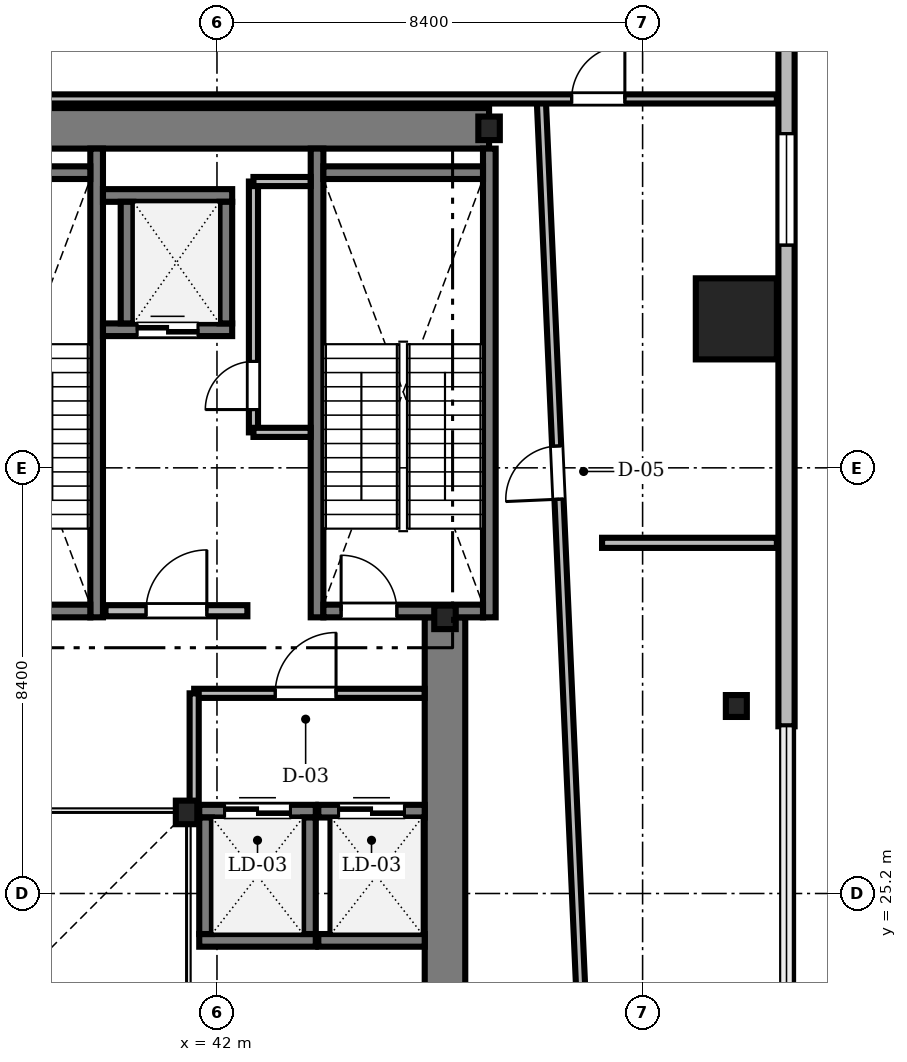
"""IFC4 building model, lengths in metres.
Left out: names, types, materials, properties, quantities, classifications, styles, units other than length and angle.
Written with IfcOpenShell. Run it as: python <this file> out.ifc"""

import sys

from ifc_helpers import new_model, si_unit, direction, frame, frame_2d, origin, origin_2d, place, context, subcontext, project, spatial, rectangle, i_section, extrude, source, transform, mapped, element, fill, save


model = new_model("IFC4")
c1 = context("Model", 3, precision=1e-05, world=origin(), true_north=direction((0.0, 1.0)))
c2 = subcontext(c1, "Body", "Model", "MODEL_VIEW")
j1 = project(units=[si_unit("LENGTHUNIT", "METRE"), si_unit("PLANEANGLEUNIT", "RADIAN")], contexts=[c1])
p1 = place(None, origin())
s1 = spatial("IfcSite", under=j1, at=p1, CompositionType="ELEMENT")
p2 = place(p1, origin())
s2 = spatial("IfcBuilding", under=s1, at=p2, CompositionType="ELEMENT")
p3 = place(p2, frame((0.0, 0.0, 98.7)))
s3 = spatial("IfcBuildingStorey", under=s2, at=p3, CompositionType="ELEMENT", Elevation=98.7)
m1 = source(origin(), c2, "Body", "SweptSolid", [
    extrude(rectangle(XDim=17.52, YDim=0.8, at=frame_2d((8.76, 0.0))), origin(), (0.0, 0.0, 1.0), 4.76),
])
p4 = place(p3, frame((29.85, 40.3, 0.0), z_axis=(0.0, 0.0, 1.0), x_axis=(1.0, 0.0, 0.0)))
e1 = element("IfcWall", 1, at=p4, inside=s3, PredefinedType="SHEAR", context=c2, shape_type="MappedRepresentation", body=[
    mapped(m1, transform((0.0, 0.0, 0.0), scale=1.0)),
])
m2 = source(origin(), c2, "Body", "SweptSolid", [
    extrude(rectangle(XDim=13.15, YDim=0.8, at=frame_2d((6.575, 0.0))), origin(), (0.0, 0.0, 1.0), 4.76),
])
p5 = place(p3, frame((46.5, 17.5, 0.0), z_axis=(0.0, 0.0, 1.0), x_axis=(0.0, 1.0, 0.0)))
e2 = element("IfcWall", 2, at=p5, inside=s3, PredefinedType="SHEAR", context=c2, shape_type="MappedRepresentation", body=[
    mapped(m2, transform((0.0, 0.0, 0.0), scale=1.0)),
])
m3 = source(origin(), c2, "Body", "SweptSolid", [
    extrude(i_section(OverallWidth=0.424, OverallDepth=0.465, WebThickness=0.035, FlangeThickness=0.056, FilletRadius=0.015, at=origin_2d()), origin(), (0.0, 0.0, 1.0), 4.76),
])
for number, where, z_axis, x_axis in (
    (3, (41.4, 26.8, 0.0), (0.0, 0.0, 1.0), (1.0, 0.0, 0.0)),
    (4, (46.5, 30.65, 0.0), (0.0, 0.0, 1.0), (1.0, 0.0, 0.0)),
    (5, (47.37, 40.3, 0.0), (0.0, 0.0, 1.0), (1.0, 0.0, 0.0)),
):
    element("IfcColumn", number, at=place(p3, frame(where, z_axis=z_axis, x_axis=x_axis)), inside=s3, PredefinedType="COLUMN", context=c2, shape_type="MappedRepresentation", body=[
        mapped(m3, transform((0.0, 0.0, 0.0), scale=1.0)),
    ])
m4 = source(origin(), c2, "Body", "SweptSolid", [
    extrude(rectangle(XDim=1.6, YDim=1.6, at=origin_2d()), origin(), (0.0, 0.0, 1.0), 4.76),
])
p6 = place(p3, frame((52.25, 36.54, 0.0), z_axis=(0.0, 0.0, 1.0), x_axis=(1.0, 0.0, 0.0)))
e6 = element("IfcColumn", 6, at=p6, inside=s3, PredefinedType="COLUMN", context=c2, shape_type="MappedRepresentation", body=[
    mapped(m4, transform((0.0, 0.0, 0.0), scale=1.0)),
])
m5 = source(origin(), c2, "Body", "SweptSolid", [
    extrude(i_section(OverallWidth=0.414, OverallDepth=0.432, WebThickness=0.026, FlangeThickness=0.04, FilletRadius=0.015, at=origin_2d()), origin(), (0.0, 0.0, 1.0), 4.76),
])
p7 = place(p3, frame((52.25, 28.9, 0.0), z_axis=(0.0, 0.0, 1.0), x_axis=(1.0, 0.0, 0.0)))
e7 = element("IfcColumn", 7, at=p7, inside=s3, PredefinedType="COLUMN", context=c2, shape_type="MappedRepresentation", body=[
    mapped(m5, transform((0.0, 0.0, 0.0), scale=1.0)),
])
m6 = source(origin(), c2, "Body", "SweptSolid", [
    extrude(rectangle(XDim=15.6, YDim=0.32, at=frame_2d((7.8, 0.0))), origin(), (0.0, 0.0, 1.0), 4.76),
])
p8 = place(p3, frame((53.24, 28.5, 0.0), z_axis=(0.0, 0.0, 1.0), x_axis=(0.0, 1.0, 0.0)))
e8 = element("IfcWall", 8, at=p8, inside=s3, PredefinedType="SOLIDWALL", context=c2, shape_type="MappedRepresentation", body=[
    mapped(m6, transform((0.0, 0.0, 0.0), scale=1.0)),
])
m7 = source(origin(), c2, "Body", "SweptSolid", [
    extrude(rectangle(XDim=2.2, YDim=2.4, at=frame_2d((1.1, 1.2))), frame((0.0, 0.17, 0.0), z_axis=(0.0, -1.0, 0.0), x_axis=(1.0, 0.0, 0.0)), (0.0, 0.0, 1.0), 0.34),
])
p9 = place(p8, frame((9.495, 0.0, 0.72)))
e9 = element("IfcOpeningElement", 9, at=p9, cuts=e8, PredefinedType="OPENING", context=c2, shape_type="MappedRepresentation", body=[
    mapped(m7, transform((0.0, 0.0, 0.0), scale=1.0)),
])
m8 = source(origin(), c2, "Body", "SweptSolid", [
    extrude(rectangle(XDim=9.25, YDim=0.25, at=frame_2d((4.625, 0.0))), origin(), (0.0, 0.0, 1.0), 4.8),
])
p10 = place(p3, frame((39.625, 30.65, 0.0), z_axis=(0.0, 0.0, 1.0), x_axis=(0.0, 1.0, 0.0)))
e10 = element("IfcWall", 10, at=p10, inside=s3, PredefinedType="SOLIDWALL", context=c2, shape_type="MappedRepresentation", body=[
    mapped(m8, transform((0.0, 0.0, 0.0), scale=1.0)),
])
m9 = source(origin(), c2, "Body", "SweptSolid", [
    extrude(rectangle(XDim=3.15, YDim=0.25, at=frame_2d((1.575, 0.0))), origin(), (0.0, 0.0, 1.0), 4.8),
])
p11 = place(p3, frame((36.35, 39.425, 0.0), z_axis=(0.0, 0.0, 1.0), x_axis=(1.0, 0.0, 0.0)))
e11 = element("IfcWall", 11, at=p11, inside=s3, PredefinedType="SOLIDWALL", context=c2, shape_type="MappedRepresentation", body=[
    mapped(m9, transform((0.0, 0.0, 0.0), scale=1.0)),
])
p12 = place(p3, frame((36.35, 30.775, 0.0), z_axis=(0.0, 0.0, 1.0), x_axis=(1.0, 0.0, 0.0)))
e12 = element("IfcWall", 12, at=p12, inside=s3, PredefinedType="SOLIDWALL", context=c2, shape_type="MappedRepresentation", body=[
    mapped(m9, transform((0.0, 0.0, 0.0), scale=1.0)),
])
m10 = source(origin(), c2, "Body", "SweptSolid", [
    extrude(rectangle(XDim=1.1, YDim=2.2, at=frame_2d((0.55, 1.1))), frame((0.0, 0.135, 0.0), z_axis=(0.0, -1.0, 0.0), x_axis=(1.0, 0.0, 0.0)), (0.0, 0.0, 1.0), 0.27),
])
p13 = place(p12, frame((0.35, 0.0, 0.0)))
e13 = element("IfcOpeningElement", 13, at=p13, cuts=e12, PredefinedType="OPENING", context=c2, shape_type="MappedRepresentation", body=[
    mapped(m10, transform((0.0, 0.0, 0.0), scale=1.0)),
])
for number, where, z_axis, x_axis in (
    (14, (43.975, 30.65, 0.0), (0.0, 0.0, 1.0), (0.0, 1.0, 0.0)),
    (15, (47.375, 30.65, 0.0), (0.0, 0.0, 1.0), (0.0, 1.0, 0.0)),
):
    element("IfcWall", number, at=place(p3, frame(where, z_axis=z_axis, x_axis=x_axis)), inside=s3, PredefinedType="SOLIDWALL", context=c2, shape_type="MappedRepresentation", body=[
        mapped(m8, transform((0.0, 0.0, 0.0), scale=1.0)),
    ])
p14 = place(p3, frame((44.1, 39.425, 0.0), z_axis=(0.0, 0.0, 1.0), x_axis=(1.0, 0.0, 0.0)))
e16 = element("IfcWall", 16, at=p14, inside=s3, PredefinedType="SOLIDWALL", context=c2, shape_type="MappedRepresentation", body=[
    mapped(m9, transform((0.0, 0.0, 0.0), scale=1.0)),
])
p15 = place(p3, frame((44.1, 30.775, 0.0), z_axis=(0.0, 0.0, 1.0), x_axis=(1.0, 0.0, 0.0)))
e17 = element("IfcWall", 17, at=p15, inside=s3, PredefinedType="SOLIDWALL", context=c2, shape_type="MappedRepresentation", body=[
    mapped(m9, transform((0.0, 0.0, 0.0), scale=1.0)),
])
p16 = place(p15, frame((0.35, 0.0, 0.0)))
e18 = element("IfcOpeningElement", 18, at=p16, cuts=e17, PredefinedType="OPENING", context=c2, shape_type="MappedRepresentation", body=[
    mapped(m10, transform((0.0, 0.0, 0.0), scale=1.0)),
])
m11 = source(origin(), c2, "Body", "SweptSolid", [
    extrude(rectangle(XDim=2.8, YDim=0.22, at=frame_2d((1.4, 0.0))), origin(), (0.0, 0.0, 1.0), 4.76),
])
p17 = place(p3, frame((39.8, 30.78, 0.0), z_axis=(0.0, 0.0, 1.0), x_axis=(1.0, 0.0, 0.0)))
e19 = element("IfcWall", 19, at=p17, inside=s3, PredefinedType="SOLIDWALL", context=c2, shape_type="MappedRepresentation", body=[
    mapped(m11, transform((0.0, 0.0, 0.0), scale=1.0)),
])
m12 = source(origin(), c2, "Body", "SweptSolid", [
    extrude(rectangle(XDim=1.2, YDim=2.2, at=frame_2d((0.6, 1.1))), frame((0.0, 0.12, 0.0), z_axis=(0.0, -1.0, 0.0), x_axis=(1.0, 0.0, 0.0)), (0.0, 0.0, 1.0), 0.24),
])
p18 = place(p17, frame((0.8, 0.0, 0.0)))
e20 = element("IfcOpeningElement", 20, at=p18, cuts=e19, PredefinedType="OPENING", context=c2, shape_type="MappedRepresentation", body=[
    mapped(m12, transform((0.0, 0.0, 0.0), scale=1.0)),
])
m13 = source(origin(), c2, "Body", "SweptSolid", [
    extrude(rectangle(XDim=2.55, YDim=0.25, at=frame_2d((1.275, 0.0))), origin(), (0.0, 0.0, 1.0), 4.76),
])
p19 = place(p3, frame((39.75, 36.325, 0.0), z_axis=(0.0, 0.0, 1.0), x_axis=(1.0, 0.0, 0.0)))
e21 = element("IfcWall", 21, at=p19, inside=s3, PredefinedType="SOLIDWALL", context=c2, shape_type="MappedRepresentation", body=[
    mapped(m13, transform((0.0, 0.0, 0.0), scale=1.0)),
])
m14 = source(origin(), c2, "Body", "SweptSolid", [
    extrude(rectangle(XDim=1.2, YDim=2.25, at=frame_2d((0.6, 1.125))), frame((0.0, 0.135, 0.0), z_axis=(0.0, -1.0, 0.0), x_axis=(1.0, 0.0, 0.0)), (0.0, 0.0, 1.0), 0.27),
])
p20 = place(p19, frame((0.675, 0.0, 0.0)))
e22 = element("IfcOpeningElement", 22, at=p20, cuts=e21, PredefinedType="OPENING", context=c2, shape_type="MappedRepresentation", body=[
    mapped(m14, transform((0.0, 0.0, 0.0), scale=1.0)),
])
p21 = place(p3, frame((39.75, 38.975, 0.0), z_axis=(0.0, 0.0, 1.0), x_axis=(1.0, 0.0, 0.0)))
e23 = element("IfcWall", 23, at=p21, inside=s3, PredefinedType="SOLIDWALL", context=c2, shape_type="MappedRepresentation", body=[
    mapped(m13, transform((0.0, 0.0, 0.0), scale=1.0)),
])
m15 = source(origin(), c2, "Body", "SweptSolid", [
    extrude(rectangle(XDim=2.4, YDim=0.25, at=frame_2d((1.2, 0.0))), origin(), (0.0, 0.0, 1.0), 4.76),
])
for number, where, z_axis, x_axis in (
    (24, (40.225, 36.45, 0.0), (0.0, 0.0, 1.0), (0.0, 1.0, 0.0)),
    (25, (42.175, 36.45, 0.0), (0.0, 0.0, 1.0), (0.0, 1.0, 0.0)),
):
    element("IfcWall", number, at=place(p3, frame(where, z_axis=z_axis, x_axis=x_axis)), inside=s3, PredefinedType="SOLIDWALL", context=c2, shape_type="MappedRepresentation", body=[
        mapped(m15, transform((0.0, 0.0, 0.0), scale=1.0)),
    ])
m16 = source(origin(), c2, "Body", "SweptSolid", [
    extrude(rectangle(XDim=2.3, YDim=0.25, at=frame_2d((1.15, 0.0))), origin(), (0.0, 0.0, 1.0), 4.76),
])
p22 = place(p3, frame((41.65, 24.275, 0.0), z_axis=(0.0, 0.0, 1.0), x_axis=(1.0, 0.0, 0.0)))
e26 = element("IfcWall", 26, at=p22, inside=s3, PredefinedType="SOLIDWALL", context=c2, shape_type="MappedRepresentation", body=[
    mapped(m16, transform((0.0, 0.0, 0.0), scale=1.0)),
])
p23 = place(p3, frame((41.65, 26.825, 0.0), z_axis=(0.0, 0.0, 1.0), x_axis=(1.0, 0.0, 0.0)))
e27 = element("IfcWall", 27, at=p23, inside=s3, PredefinedType="SOLIDWALL", context=c2, shape_type="MappedRepresentation", body=[
    mapped(m16, transform((0.0, 0.0, 0.0), scale=1.0)),
])
m17 = source(origin(), c2, "Body", "SweptSolid", [
    extrude(rectangle(XDim=1.3, YDim=2.3, at=frame_2d((0.65, 1.15))), frame((0.0, 0.135, 0.0), z_axis=(0.0, -1.0, 0.0), x_axis=(1.0, 0.0, 0.0)), (0.0, 0.0, 1.0), 0.27),
])
p24 = place(p23, frame((0.5, 0.0, 0.0)))
e28 = element("IfcOpeningElement", 28, at=p24, cuts=e27, PredefinedType="OPENING", context=c2, shape_type="MappedRepresentation", body=[
    mapped(m17, transform((0.0, 0.0, 0.0), scale=1.0)),
])
for number, where, z_axis, x_axis in (
    (29, (41.775, 24.4, 0.0), (0.0, 0.0, 1.0), (0.0, 1.0, 0.0)),
    (30, (43.825, 24.4, 0.0), (0.0, 0.0, 1.0), (0.0, 1.0, 0.0)),
):
    element("IfcWall", number, at=place(p3, frame(where, z_axis=z_axis, x_axis=x_axis)), inside=s3, PredefinedType="SOLIDWALL", context=c2, shape_type="MappedRepresentation", body=[
        mapped(m16, transform((0.0, 0.0, 0.0), scale=1.0)),
    ])
m18 = source(origin(), c2, "Body", "SweptSolid", [
    extrude(rectangle(XDim=2.1, YDim=0.25, at=frame_2d((1.05, 0.0))), origin(), (0.0, 0.0, 1.0), 4.76),
])
p25 = place(p3, frame((44.0, 24.275, 0.0), z_axis=(0.0, 0.0, 1.0), x_axis=(1.0, 0.0, 0.0)))
e31 = element("IfcWall", 31, at=p25, inside=s3, PredefinedType="SOLIDWALL", context=c2, shape_type="MappedRepresentation", body=[
    mapped(m18, transform((0.0, 0.0, 0.0), scale=1.0)),
])
p26 = place(p3, frame((44.0, 26.825, 0.0), z_axis=(0.0, 0.0, 1.0), x_axis=(1.0, 0.0, 0.0)))
e32 = element("IfcWall", 32, at=p26, inside=s3, PredefinedType="SOLIDWALL", context=c2, shape_type="MappedRepresentation", body=[
    mapped(m18, transform((0.0, 0.0, 0.0), scale=1.0)),
])
p27 = place(p26, frame((0.4, 0.0, 0.0)))
e33 = element("IfcOpeningElement", 33, at=p27, cuts=e32, PredefinedType="OPENING", context=c2, shape_type="MappedRepresentation", body=[
    mapped(m17, transform((0.0, 0.0, 0.0), scale=1.0)),
])
m19 = source(origin(), c2, "Body", "SweptSolid", [
    extrude(rectangle(XDim=27.106, YDim=0.18, at=frame_2d((13.553, 0.0))), origin(), (0.0, 0.0, 1.0), 4.152),
])
p28 = place(p3, frame((49.6, 13.8, 0.0), z_axis=(0.0, 0.0, 1.0), x_axis=(-0.044277164483, 0.999019285452, 0.0)))
e34 = element("IfcWall", 34, at=p28, inside=s3, PredefinedType="PARTITIONING", context=c2, shape_type="MappedRepresentation", body=[
    mapped(m19, transform((0.0, 0.0, 0.0), scale=1.0)),
])
m20 = source(origin(), c2, "Body", "SweptSolid", [
    extrude(rectangle(XDim=1.8, YDim=2.4, at=frame_2d((0.9, 1.2))), frame((0.0, 0.1, 0.0), z_axis=(0.0, -1.0, 0.0), x_axis=(1.0, 0.0, 0.0)), (0.0, 0.0, 1.0), 0.2),
])
p29 = place(p28, frame((2.4, 0.0, 0.0)))
e35 = element("IfcOpeningElement", 35, at=p29, cuts=e34, PredefinedType="OPENING", context=c2, shape_type="MappedRepresentation", body=[
    mapped(m20, transform((0.0, 0.0, 0.0), scale=1.0)),
])
m21 = source(origin(), c2, "Body", "SweptSolid", [
    extrude(rectangle(XDim=1.05, YDim=2.2, at=frame_2d((0.525, 1.1))), frame((0.0, 0.1, 0.0), z_axis=(0.0, -1.0, 0.0), x_axis=(1.0, 0.0, 0.0)), (0.0, 0.0, 1.0), 0.2),
])
p30 = place(p28, frame((19.2, 0.0, 0.0)))
e36 = element("IfcOpeningElement", 36, at=p30, cuts=e34, PredefinedType="OPENING", context=c2, shape_type="MappedRepresentation", body=[
    mapped(m21, transform((0.0, 0.0, 0.0), scale=1.0)),
])
m22 = source(origin(), c2, "Body", "SweptSolid", [
    extrude(rectangle(XDim=24.3, YDim=0.18, at=frame_2d((12.15, 0.0))), origin(), (0.0, 0.0, 1.0), 4.002),
])
p31 = place(p3, frame((28.75, 40.88, 0.0), z_axis=(0.0, 0.0, 1.0), x_axis=(1.0, 0.0, 0.0)))
e37 = element("IfcWall", 37, at=p31, inside=s3, PredefinedType="PARTITIONING", context=c2, shape_type="MappedRepresentation", body=[
    mapped(m22, transform((0.0, 0.0, 0.0), scale=1.0)),
])
p32 = place(p31, frame((20.25, 0.0, 0.0)))
e38 = element("IfcOpeningElement", 38, at=p32, cuts=e37, PredefinedType="OPENING", context=c2, shape_type="MappedRepresentation", body=[
    mapped(m21, transform((0.0, 0.0, 0.0), scale=1.0)),
])
m23 = source(origin(), c2, "Body", "SweptSolid", [
    extrude(rectangle(XDim=4.95, YDim=0.18, at=frame_2d((2.475, 0.0))), origin(), (0.0, 0.0, 1.0), 4.76),
])
p33 = place(p3, frame((42.72, 34.3, 0.0), z_axis=(0.0, 0.0, 1.0), x_axis=(0.0, 1.0, 0.0)))
e39 = element("IfcWall", 39, at=p33, inside=s3, PredefinedType="PARTITIONING", context=c2, shape_type="MappedRepresentation", body=[
    mapped(m23, transform((0.0, 0.0, 0.0), scale=1.0)),
])
m24 = source(origin(), c2, "Body", "SweptSolid", [
    extrude(rectangle(XDim=0.95, YDim=2.15, at=frame_2d((0.475, 1.075))), frame((0.0, 0.1, 0.0), z_axis=(0.0, -1.0, 0.0), x_axis=(1.0, 0.0, 0.0)), (0.0, 0.0, 1.0), 0.2),
])
p34 = place(p33, frame((0.45, 0.0, 0.0)))
e40 = element("IfcOpeningElement", 40, at=p34, cuts=e39, PredefinedType="OPENING", context=c2, shape_type="MappedRepresentation", body=[
    mapped(m24, transform((0.0, 0.0, 0.0), scale=1.0)),
])
m25 = source(origin(), c2, "Body", "SweptSolid", [
    extrude(rectangle(XDim=4.548, YDim=0.18, at=frame_2d((2.274, 0.0))), origin(), (0.0, 0.0, 1.0), 4.392),
])
p35 = place(p3, frame((41.55, 29.15, 0.0), z_axis=(0.0, 0.0, 1.0), x_axis=(1.0, 0.0, 0.0)))
e41 = element("IfcWall", 41, at=p35, inside=s3, PredefinedType="PARTITIONING", context=c2, shape_type="MappedRepresentation", body=[
    mapped(m25, transform((0.0, 0.0, 0.0), scale=1.0)),
])
m26 = source(origin(), c2, "Body", "SweptSolid", [
    extrude(rectangle(XDim=1.2, YDim=2.2, at=frame_2d((0.6, 1.1))), frame((0.0, 0.1, 0.0), z_axis=(0.0, -1.0, 0.0), x_axis=(1.0, 0.0, 0.0)), (0.0, 0.0, 1.0), 0.2),
])
p36 = place(p35, frame((1.6, 0.0, 0.0)))
e42 = element("IfcOpeningElement", 42, at=p36, cuts=e41, PredefinedType="OPENING", context=c2, shape_type="MappedRepresentation", body=[
    mapped(m26, transform((0.0, 0.0, 0.0), scale=1.0)),
])
m27 = source(origin(), c2, "Body", "SweptSolid", [
    extrude(rectangle(XDim=3.45, YDim=0.2, at=frame_2d((1.725, 0.0))), origin(), (0.0, 0.0, 1.0), 4.002),
])
p37 = place(p3, frame((49.6, 32.12, 0.0), z_axis=(0.0, 0.0, 1.0), x_axis=(1.0, 0.0, 0.0)))
e43 = element("IfcWall", 43, at=p37, inside=s3, PredefinedType="PARTITIONING", context=c2, shape_type="MappedRepresentation", body=[
    mapped(m27, transform((0.0, 0.0, 0.0), scale=1.0)),
])
m28 = source(origin(), c2, "Body", "SweptSolid", [
    extrude(rectangle(XDim=2.35, YDim=0.18, at=frame_2d((1.175, 0.0))), origin(), (0.0, 0.0, 1.0), 4.152),
])
p38 = place(p3, frame((41.55, 26.8, 0.0), z_axis=(0.0, 0.0, 1.0), x_axis=(0.0, 1.0, 0.0)))
e44 = element("IfcWall", 44, at=p38, inside=s3, PredefinedType="PARTITIONING", context=c2, shape_type="MappedRepresentation", body=[
    mapped(m28, transform((0.0, 0.0, 0.0), scale=1.0)),
])
m29 = source(origin(), c2, "Body", "SweptSolid", [
    extrude(rectangle(XDim=1.128, YDim=0.18, at=frame_2d((0.564, 0.0))), origin(), (0.0, 0.0, 1.0), 4.76),
])
for number, where, z_axis, x_axis in (
    (45, (42.72, 34.3, 0.0), (0.0, 0.0, 1.0), (1.0, 0.0, 0.0)),
    (46, (42.72, 39.25, 0.0), (0.0, 0.0, 1.0), (1.0, 0.0, 0.0)),
):
    element("IfcWall", number, at=place(p3, frame(where, z_axis=z_axis, x_axis=x_axis)), inside=s3, PredefinedType="PARTITIONING", context=c2, shape_type="MappedRepresentation", body=[
        mapped(m29, transform((0.0, 0.0, 0.0), scale=1.0)),
    ])
m30 = source(origin(), c2, "Body", "SweptSolid", [
    extrude(rectangle(XDim=2.2, YDim=2.4, at=frame_2d((1.1, 1.2))), frame((0.0, 0.03, 0.0), z_axis=(0.0, -1.0, 0.0), x_axis=(1.0, 0.0, 0.0)), (0.0, 0.0, 1.0), 0.06),
])
p39 = place(p9, origin())
e47 = element("IfcWindow", 47, at=p39, inside=s3, PartitioningType="SINGLE_PANEL", PredefinedType="WINDOW", context=c2, shape_type="MappedRepresentation", body=[
    mapped(m30, transform((0.0, 0.0, 0.0), scale=1.0)),
])
fill(e9, e47)
m31 = source(origin(), c2, "Body", "SweptSolid", [
    extrude(rectangle(XDim=1.1, YDim=2.2, at=frame_2d((0.55, 1.1))), frame((0.0, 0.025, 0.0), z_axis=(0.0, -1.0, 0.0), x_axis=(1.0, 0.0, 0.0)), (0.0, 0.0, 1.0), 0.05),
])
p40 = place(p16, origin())
e48 = element("IfcDoor", 48, at=p40, inside=s3, OperationType="SINGLE_SWING_LEFT", PredefinedType="DOOR", context=c2, shape_type="MappedRepresentation", body=[
    mapped(m31, transform((0.0, 0.0, 0.0), scale=1.0)),
])
fill(e18, e48)
m32 = source(origin(), c2, "Body", "SweptSolid", [
    extrude(rectangle(XDim=1.2, YDim=2.2, at=frame_2d((0.6, 1.1))), frame((0.0, 0.025, 0.0), z_axis=(0.0, -1.0, 0.0), x_axis=(1.0, 0.0, 0.0)), (0.0, 0.0, 1.0), 0.05),
])
p41 = place(p18, origin())
e49 = element("IfcDoor", 49, at=p41, inside=s3, OperationType="SINGLE_SWING_RIGHT", PredefinedType="DOOR", context=c2, shape_type="MappedRepresentation", body=[
    mapped(m32, transform((0.0, 0.0, 0.0), scale=1.0)),
])
fill(e20, e49)
m33 = source(origin(), c2, "Body", "SweptSolid", [
    extrude(rectangle(XDim=1.2, YDim=2.25, at=frame_2d((0.6, 1.125))), frame((0.0, 0.025, 0.0), z_axis=(0.0, -1.0, 0.0), x_axis=(1.0, 0.0, 0.0)), (0.0, 0.0, 1.0), 0.05),
])
p42 = place(p20, origin())
e50 = element("IfcDoor", 50, at=p42, inside=s3, OperationType="DOUBLE_DOOR_SLIDING", PredefinedType="DOOR", context=c2, shape_type="MappedRepresentation", body=[
    mapped(m33, transform((0.0, 0.0, 0.0), scale=1.0)),
])
fill(e22, e50)
m34 = source(origin(), c2, "Body", "SweptSolid", [
    extrude(rectangle(XDim=1.3, YDim=2.3, at=frame_2d((0.65, 1.15))), frame((0.0, 0.025, 0.0), z_axis=(0.0, -1.0, 0.0), x_axis=(1.0, 0.0, 0.0)), (0.0, 0.0, 1.0), 0.05),
])
p43 = place(p24, origin())
e51 = element("IfcDoor", 51, at=p43, inside=s3, OperationType="DOUBLE_DOOR_SLIDING", PredefinedType="DOOR", context=c2, shape_type="MappedRepresentation", body=[
    mapped(m34, transform((0.0, 0.0, 0.0), scale=1.0)),
])
fill(e28, e51)
p44 = place(p27, origin())
e52 = element("IfcDoor", 52, at=p44, inside=s3, OperationType="DOUBLE_DOOR_SLIDING", PredefinedType="DOOR", context=c2, shape_type="MappedRepresentation", body=[
    mapped(m34, transform((0.0, 0.0, 0.0), scale=1.0)),
])
fill(e33, e52)
m35 = source(origin(), c2, "Body", "SweptSolid", [
    extrude(rectangle(XDim=1.05, YDim=2.2, at=frame_2d((0.525, 1.1))), frame((0.0, 0.025, 0.0), z_axis=(0.0, -1.0, 0.0), x_axis=(1.0, 0.0, 0.0)), (0.0, 0.0, 1.0), 0.05),
])
p45 = place(p30, origin())
e53 = element("IfcDoor", 53, at=p45, inside=s3, OperationType="SINGLE_SWING_LEFT", PredefinedType="DOOR", context=c2, shape_type="MappedRepresentation", body=[
    mapped(m35, transform((0.0, 0.0, 0.0), scale=1.0)),
])
fill(e36, e53)
p46 = place(p32, origin())
e54 = element("IfcDoor", 54, at=p46, inside=s3, OperationType="SINGLE_SWING_RIGHT", PredefinedType="DOOR", context=c2, shape_type="MappedRepresentation", body=[
    mapped(m35, transform((0.0, 0.0, 0.0), scale=1.0)),
])
fill(e38, e54)
m36 = source(origin(), c2, "Body", "SweptSolid", [
    extrude(rectangle(XDim=0.95, YDim=2.15, at=frame_2d((0.475, 1.075))), frame((0.0, 0.025, 0.0), z_axis=(0.0, -1.0, 0.0), x_axis=(1.0, 0.0, 0.0)), (0.0, 0.0, 1.0), 0.05),
])
p47 = place(p34, origin())
e55 = element("IfcDoor", 55, at=p47, inside=s3, OperationType="SINGLE_SWING_LEFT", PredefinedType="DOOR", context=c2, shape_type="MappedRepresentation", body=[
    mapped(m36, transform((0.0, 0.0, 0.0), scale=1.0)),
])
fill(e40, e55)
p48 = place(p36, origin())
e56 = element("IfcDoor", 56, at=p48, inside=s3, OperationType="SINGLE_SWING_RIGHT", PredefinedType="DOOR", context=c2, shape_type="MappedRepresentation", body=[
    mapped(m32, transform((0.0, 0.0, 0.0), scale=1.0)),
])
fill(e42, e56)
save(model, sys.argv[1])
